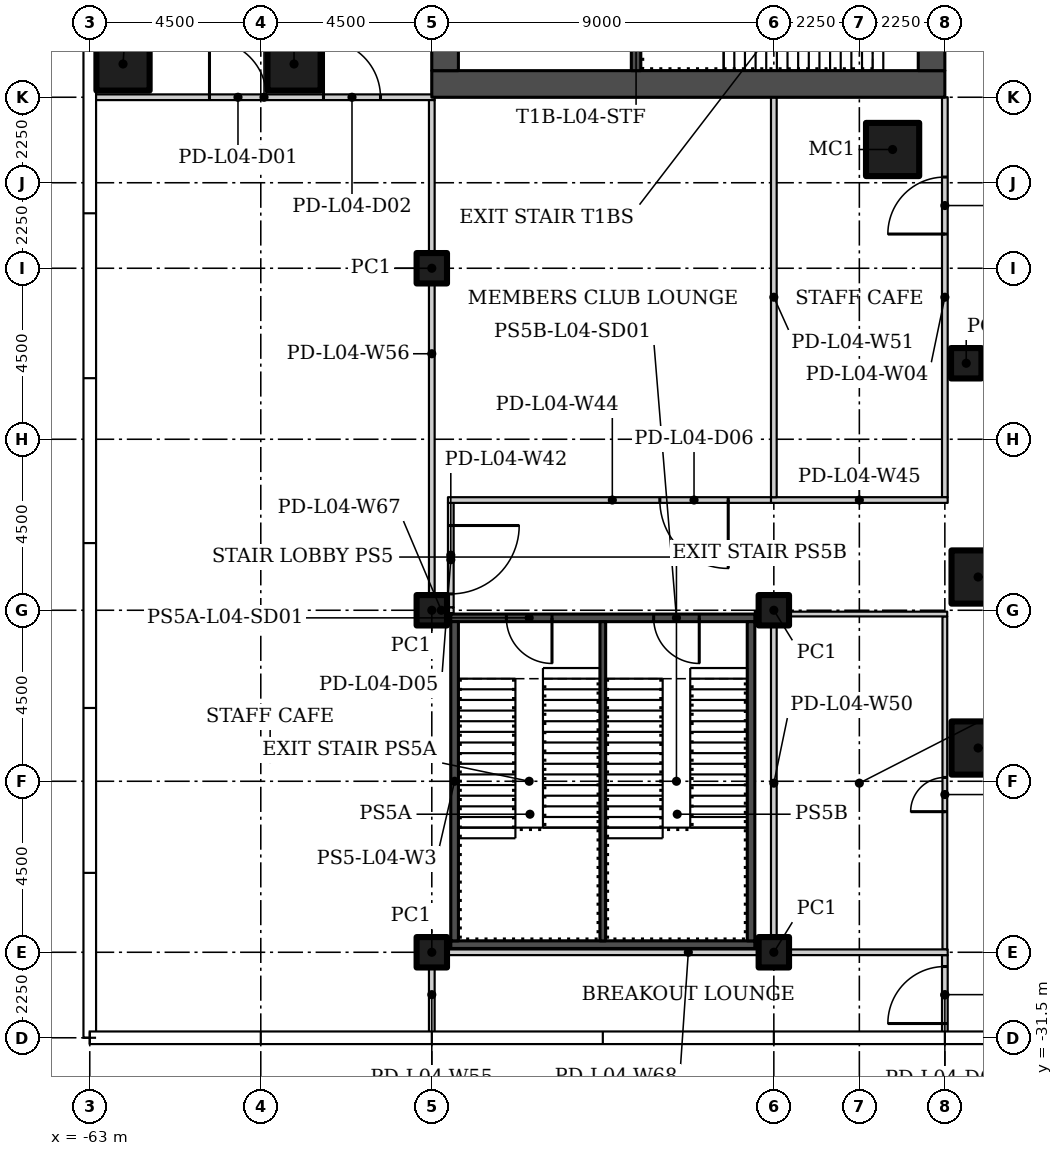
"""IFC4 building model, lengths in metres.
Left out: names, types, materials, properties, quantities, classifications, styles, units other than length and angle.
Written with IfcOpenShell. Run it as: python <this file> out.ifc"""

import sys

from ifc_helpers import new_model, si_unit, direction, frame, frame_2d, origin, origin_2d, place, context, subcontext, project, spatial, rectangle, hollow_rectangle, extrude, element, fill, save


model = new_model("IFC4")
c1 = context("Model", 3, precision=1e-05, world=origin(), true_north=direction((0.0, 1.0)))
c2 = subcontext(c1, "Body", "Model", "MODEL_VIEW")
j1 = project(units=[si_unit("LENGTHUNIT", "METRE"), si_unit("PLANEANGLEUNIT", "RADIAN")], contexts=[c1])
p1 = place(None, origin())
s1 = spatial("IfcSite", under=j1, at=p1, CompositionType="ELEMENT")
p2 = place(p1, origin())
s2 = spatial("IfcBuilding", under=s1, at=p2, CompositionType="ELEMENT")
p3 = place(p2, frame((0.0, 0.0, 23.5)))
s3 = spatial("IfcBuildingStorey", under=s2, at=p3, CompositionType="ELEMENT", Elevation=23.5)
for number, where in (
    (1, (-41.875, -8.125, 0.0)),
    (2, (-57.625, -5.875, 0.0)),
    (3, (-62.125, -5.875, 0.0)),
):
    element("IfcColumn", number, at=place(p3, frame(where)), inside=s3, PredefinedType="COLUMN", context=c2, shape_type="SweptSolid", body=[
        extrude(hollow_rectangle(XDim=1.4, YDim=1.4, WallThickness=0.06, at=origin_2d()), origin(), (0.0, 0.0, 1.0), 4.65),
    ])
p4 = place(p3, frame((-39.938, -13.75, 0.0)))
e4 = element("IfcColumn", 4, at=p4, inside=s3, PredefinedType="COLUMN", context=c2, shape_type="SweptSolid", body=[
    extrude(hollow_rectangle(XDim=0.8, YDim=0.8, WallThickness=0.03, at=origin_2d()), origin(), (0.0, 0.0, 1.0), 4.65),
])
for number, where in (
    (5, (-39.625, -19.375, 0.0)),
    (6, (-39.625, -23.875, 0.0)),
):
    element("IfcColumn", number, at=place(p3, frame(where)), inside=s3, PredefinedType="COLUMN", context=c2, shape_type="SweptSolid", body=[
        extrude(hollow_rectangle(XDim=1.4, YDim=1.4, WallThickness=0.06, at=origin_2d()), origin(), (0.0, 0.0, 1.0), 4.65),
    ])
for number, where in (
    (7, (-54.0, -29.25, 0.0)),
    (8, (-54.0, -20.25, 0.0)),
    (9, (-54.0, -11.25, 0.0)),
    (10, (-45.0, -29.25, 0.0)),
    (11, (-45.0, -20.25, 0.0)),
):
    element("IfcColumn", number, at=place(p3, frame(where)), inside=s3, PredefinedType="COLUMN", context=c2, shape_type="SweptSolid", body=[
        extrude(hollow_rectangle(XDim=0.8, YDim=0.8, WallThickness=0.03, at=origin_2d()), origin(), (0.0, 0.0, 1.0), 4.65),
    ])
p5 = place(p3, frame((-40.5, -31.405, 0.0), z_axis=(0.0, 0.0, 1.0), x_axis=(0.0, 1.0, 0.0)))
e12 = element("IfcWall", 12, at=p5, inside=s3, PredefinedType="PARTITIONING", context=c2, shape_type="SweptSolid", body=[
    extrude(rectangle(XDim=2.08, YDim=0.15, at=frame_2d((1.04, 0.0))), origin(), (0.0, 0.0, 1.0), 4.65),
])
p6 = place(p5, frame((0.28, 0.0, 0.0)))
e13 = element("IfcOpeningElement", 13, at=p6, cuts=e12, PredefinedType="OPENING", context=c2, shape_type="SweptSolid", body=[
    extrude(rectangle(XDim=1.5, YDim=2.1, at=frame_2d((0.75, 1.05))), frame((0.0, 0.085, 0.0), z_axis=(0.0, -1.0, 0.0), x_axis=(1.0, 0.0, 0.0)), (0.0, 0.0, 1.0), 0.17),
])
p7 = place(p3, frame((-40.5, -17.275, 0.0), z_axis=(0.0, 0.0, 1.0), x_axis=(0.0, 1.0, 0.0)))
e14 = element("IfcWall", 14, at=p7, inside=s3, PredefinedType="PARTITIONING", context=c2, shape_type="SweptSolid", body=[
    extrude(rectangle(XDim=10.525, YDim=0.15, at=frame_2d((5.262, 0.0))), origin(), (0.0, 0.0, 1.0), 4.65),
])
p8 = place(p7, frame((6.925, 0.0, 0.0)))
e15 = element("IfcOpeningElement", 15, at=p8, cuts=e14, PredefinedType="OPENING", context=c2, shape_type="SweptSolid", body=[
    extrude(rectangle(XDim=1.5, YDim=2.1, at=frame_2d((0.75, 1.05))), frame((0.0, 0.085, 0.0), z_axis=(0.0, -1.0, 0.0), x_axis=(1.0, 0.0, 0.0)), (0.0, 0.0, 1.0), 0.17),
])
p9 = place(p3, frame((-40.5, -29.175, 0.0), z_axis=(0.0, 0.0, 1.0), x_axis=(0.0, 1.0, 0.0)))
e16 = element("IfcWall", 16, at=p9, inside=s3, PredefinedType="PARTITIONING", context=c2, shape_type="SweptSolid", body=[
    extrude(rectangle(XDim=8.763, YDim=0.125, at=frame_2d((4.381, 0.0))), origin(), (0.0, 0.0, 1.0), 4.65),
])
p10 = place(p9, frame((3.625, 0.0, 0.0)))
e17 = element("IfcOpeningElement", 17, at=p10, cuts=e16, PredefinedType="OPENING", context=c2, shape_type="SweptSolid", body=[
    extrude(rectangle(XDim=0.9, YDim=2.1, at=frame_2d((0.45, 1.05))), frame((0.0, 0.073, 0.0), z_axis=(0.0, -1.0, 0.0), x_axis=(1.0, 0.0, 0.0)), (0.0, 0.0, 1.0), 0.145),
])
p11 = place(p3, frame((-62.905, -6.75, 0.0)))
e18 = element("IfcWall", 18, at=p11, inside=s3, PredefinedType="PARTITIONING", context=c2, shape_type="SweptSolid", body=[
    extrude(rectangle(XDim=8.98, YDim=0.15, at=frame_2d((4.49, 0.0))), origin(), (0.0, 0.0, 1.0), 4.65),
])
p12 = place(p11, frame((3.055, 0.0, 0.0)))
e19 = element("IfcOpeningElement", 19, at=p12, cuts=e18, PredefinedType="OPENING", context=c2, shape_type="SweptSolid", body=[
    extrude(rectangle(XDim=1.5, YDim=2.1, at=frame_2d((0.75, 1.05))), frame((0.0, 0.085, 0.0), z_axis=(0.0, -1.0, 0.0), x_axis=(1.0, 0.0, 0.0)), (0.0, 0.0, 1.0), 0.17),
])
p13 = place(p11, frame((6.055, 0.0, 0.0)))
e20 = element("IfcOpeningElement", 20, at=p13, cuts=e18, PredefinedType="OPENING", context=c2, shape_type="SweptSolid", body=[
    extrude(rectangle(XDim=1.5, YDim=2.1, at=frame_2d((0.75, 1.05))), frame((0.0, 0.085, 0.0), z_axis=(0.0, -1.0, 0.0), x_axis=(1.0, 0.0, 0.0)), (0.0, 0.0, 1.0), 0.17),
])
p14 = place(p3, frame((-45.5, -20.35, 0.0)))
e21 = element("IfcWall", 21, at=p14, inside=s3, PredefinedType="PARTITIONING", context=c2, shape_type="SweptSolid", body=[
    extrude(rectangle(XDim=0.575, YDim=0.15, at=frame_2d((0.288, 0.0))), origin(), (0.0, 0.0, 1.0), 4.65),
])
p15 = place(p3, frame((-53.5, -17.425, 0.0), z_axis=(0.0, 0.0, 1.0), x_axis=(0.0, -1.0, 0.0)))
e22 = element("IfcWall", 22, at=p15, inside=s3, PredefinedType="PARTITIONING", context=c2, shape_type="SweptSolid", body=[
    extrude(rectangle(XDim=2.75, YDim=0.15, at=frame_2d((1.375, 0.0))), origin(), (0.0, 0.0, 1.0), 4.65),
])
p16 = place(p15, frame((0.595, 0.0, 0.0)))
e23 = element("IfcOpeningElement", 23, at=p16, cuts=e22, PredefinedType="OPENING", context=c2, shape_type="SweptSolid", body=[
    extrude(rectangle(XDim=1.8, YDim=2.4, at=frame_2d((0.9, 1.2))), frame((0.0, 0.085, 0.0), z_axis=(0.0, -1.0, 0.0), x_axis=(1.0, 0.0, 0.0)), (0.0, 0.0, 1.0), 0.17),
])
p17 = place(p3, frame((-44.925, -17.35, 0.0), z_axis=(0.0, 0.0, 1.0), x_axis=(-1.0, 0.0, 0.0)))
e24 = element("IfcWall", 24, at=p17, inside=s3, PredefinedType="PARTITIONING", context=c2, shape_type="SweptSolid", body=[
    extrude(rectangle(XDim=8.65, YDim=0.15, at=frame_2d((4.325, 0.0))), origin(), (0.0, 0.0, 1.0), 4.65),
])
p18 = place(p17, frame((1.275, 0.0, 0.0)))
e25 = element("IfcOpeningElement", 25, at=p18, cuts=e24, PredefinedType="OPENING", context=c2, shape_type="SweptSolid", body=[
    extrude(rectangle(XDim=1.8, YDim=2.4, at=frame_2d((0.9, 1.2))), frame((0.0, 0.085, 0.0), z_axis=(0.0, -1.0, 0.0), x_axis=(1.0, 0.0, 0.0)), (0.0, 0.0, 1.0), 0.17),
])
p19 = place(p3, frame((-45.075, -17.35, 0.0)))
e26 = element("IfcWall", 26, at=p19, inside=s3, PredefinedType="PARTITIONING", context=c2, shape_type="SweptSolid", body=[
    extrude(rectangle(XDim=4.65, YDim=0.15, at=frame_2d((2.325, 0.0))), origin(), (0.0, 0.0, 1.0), 4.65),
])
p20 = place(p3, frame((-40.438, -20.35, 0.0), z_axis=(0.0, 0.0, 1.0), x_axis=(-1.0, 0.0, 0.0)))
e27 = element("IfcWall", 27, at=p20, inside=s3, PredefinedType="PARTITIONING", context=c2, shape_type="SweptSolid", body=[
    extrude(rectangle(XDim=4.637, YDim=0.125, at=frame_2d((2.319, 0.0))), origin(), (0.0, 0.0, 1.0), 4.65),
])
p21 = place(p3, frame((-45.0, -29.175, 0.0), z_axis=(0.0, 0.0, 1.0), x_axis=(0.0, 1.0, 0.0)))
e28 = element("IfcWall", 28, at=p21, inside=s3, PredefinedType="PARTITIONING", context=c2, shape_type="SweptSolid", body=[
    extrude(rectangle(XDim=8.75, YDim=0.15, at=frame_2d((4.375, 0.0))), origin(), (0.0, 0.0, 1.0), 4.65),
])
p22 = place(p3, frame((-45.0, -17.275, 0.0), z_axis=(0.0, 0.0, 1.0), x_axis=(0.0, 1.0, 0.0)))
e29 = element("IfcWall", 29, at=p22, inside=s3, PredefinedType="PARTITIONING", context=c2, shape_type="SweptSolid", body=[
    extrude(rectangle(XDim=10.525, YDim=0.15, at=frame_2d((5.262, 0.0))), origin(), (0.0, 0.0, 1.0), 4.65),
])
p23 = place(p3, frame((-54.0, -31.405, 0.0), z_axis=(0.0, 0.0, 1.0), x_axis=(0.0, 1.0, 0.0)))
e30 = element("IfcWall", 30, at=p23, inside=s3, PredefinedType="PARTITIONING", context=c2, shape_type="SweptSolid", body=[
    extrude(rectangle(XDim=2.08, YDim=0.15, at=frame_2d((1.04, 0.0))), origin(), (0.0, 0.0, 1.0), 4.65),
])
p24 = place(p3, frame((-54.0, -20.175, 0.0), z_axis=(0.0, 0.0, 1.0), x_axis=(0.0, 1.0, 0.0)))
e31 = element("IfcWall", 31, at=p24, inside=s3, PredefinedType="PARTITIONING", context=c2, shape_type="SweptSolid", body=[
    extrude(rectangle(XDim=13.35, YDim=0.15, at=frame_2d((6.675, 0.0))), origin(), (0.0, 0.0, 1.0), 4.65),
])
p25 = place(p3, frame((-53.425, -20.25, 0.0), z_axis=(0.0, 0.0, 1.0), x_axis=(-1.0, 0.0, 0.0)))
e32 = element("IfcWall", 32, at=p25, inside=s3, PredefinedType="PARTITIONING", context=c2, shape_type="SweptSolid", body=[
    extrude(rectangle(XDim=0.65, YDim=0.15, at=frame_2d((0.325, 0.0))), origin(), (0.0, 0.0, 1.0), 4.65),
])
p26 = place(p3, frame((-54.075, -29.25, 0.0)))
e33 = element("IfcWall", 33, at=p26, inside=s3, PredefinedType="PARTITIONING", context=c2, shape_type="SweptSolid", body=[
    extrude(rectangle(XDim=13.65, YDim=0.15, at=frame_2d((6.825, 0.0))), origin(), (0.0, 0.0, 1.0), 4.65),
])
p27 = place(p3, frame((-40.5, -6.4, 0.0), z_axis=(0.0, 0.0, 1.0), x_axis=(-1.0, 0.0, 0.0)))
e34 = element("IfcWall", 34, at=p27, inside=s3, PredefinedType="SHEAR", context=c2, shape_type="SweptSolid", body=[
    extrude(rectangle(XDim=13.5, YDim=0.7, at=frame_2d((6.75, 0.0))), origin(), (0.0, 0.0, 1.0), 4.65),
])
p28 = place(p3, frame((-40.85, -6.05, 0.0), z_axis=(0.0, 0.0, 1.0), x_axis=(0.0, 1.0, 0.0)))
e35 = element("IfcWall", 35, at=p28, inside=s3, PredefinedType="SHEAR", context=c2, shape_type="SweptSolid", body=[
    extrude(rectangle(XDim=12.1, YDim=0.7, at=frame_2d((6.05, 0.0))), origin(), (0.0, 0.0, 1.0), 4.65),
])
p29 = place(p28, frame((6.4, 0.0, 0.0)))
e36 = element("IfcOpeningElement", 36, at=p29, cuts=e35, PredefinedType="OPENING", context=c2, shape_type="SweptSolid", body=[
    extrude(rectangle(XDim=1.8, YDim=2.4, at=frame_2d((0.9, 1.2))), frame((0.0, 0.36, 0.0), z_axis=(0.0, -1.0, 0.0), x_axis=(1.0, 0.0, 0.0)), (0.0, 0.0, 1.0), 0.72),
])
p30 = place(p3, frame((-53.65, -6.05, 0.0), z_axis=(0.0, 0.0, 1.0), x_axis=(0.0, 1.0, 0.0)))
e37 = element("IfcWall", 37, at=p30, inside=s3, PredefinedType="SHEAR", context=c2, shape_type="SweptSolid", body=[
    extrude(rectangle(XDim=12.1, YDim=0.7, at=frame_2d((6.05, 0.0))), origin(), (0.0, 0.0, 1.0), 4.65),
])
p31 = place(p30, frame((0.8, 0.0, 0.0)))
e38 = element("IfcOpeningElement", 38, at=p31, cuts=e37, PredefinedType="OPENING", context=c2, shape_type="SweptSolid", body=[
    extrude(rectangle(XDim=1.2, YDim=2.1, at=frame_2d((0.6, 1.05))), frame((0.0, 0.36, 0.0), z_axis=(0.0, -1.0, 0.0), x_axis=(1.0, 0.0, 0.0)), (0.0, 0.0, 1.0), 0.72),
])
p32 = place(p30, frame((6.4, 0.0, 0.0)))
e39 = element("IfcOpeningElement", 39, at=p32, cuts=e37, PredefinedType="OPENING", context=c2, shape_type="SweptSolid", body=[
    extrude(rectangle(XDim=1.8, YDim=2.4, at=frame_2d((0.9, 1.2))), frame((0.0, 0.36, 0.0), z_axis=(0.0, -1.0, 0.0), x_axis=(1.0, 0.0, 0.0)), (0.0, 0.0, 1.0), 0.72),
])
p33 = place(p3, frame((-48.625, -6.05, 0.0), z_axis=(0.0, 0.0, 1.0), x_axis=(0.0, 1.0, 0.0)))
e40 = element("IfcWall", 40, at=p33, inside=s3, PredefinedType="SHEAR", context=c2, shape_type="SweptSolid", body=[
    extrude(rectangle(XDim=2.55, YDim=0.25, at=frame_2d((1.275, 0.0))), origin(), (0.0, 0.0, 1.0), 4.65),
])
p34 = place(p3, frame((-45.5, -20.45, 0.0), z_axis=(0.0, 0.0, 1.0), x_axis=(-1.0, 0.0, 0.0)))
e41 = element("IfcWall", 41, at=p34, inside=s3, PredefinedType="SHEAR", context=c2, shape_type="SweptSolid", body=[
    extrude(rectangle(XDim=8.0, YDim=0.2, at=frame_2d((4.0, 0.0))), origin(), (0.0, 0.0, 1.0), 4.65),
])
p35 = place(p34, frame((5.337, 0.0, 0.0)))
e42 = element("IfcOpeningElement", 42, at=p35, cuts=e41, PredefinedType="OPENING", context=c2, shape_type="SweptSolid", body=[
    extrude(rectangle(XDim=1.2, YDim=2.4, at=frame_2d((0.6, 1.2))), frame((0.0, 0.11, 0.0), z_axis=(0.0, -1.0, 0.0), x_axis=(1.0, 0.0, 0.0)), (0.0, 0.0, 1.0), 0.22),
])
p36 = place(p34, frame((1.462, 0.0, 0.0)))
e43 = element("IfcOpeningElement", 43, at=p36, cuts=e41, PredefinedType="OPENING", context=c2, shape_type="SweptSolid", body=[
    extrude(rectangle(XDim=1.2, YDim=2.4, at=frame_2d((0.6, 1.2))), frame((0.0, 0.11, 0.0), z_axis=(0.0, -1.0, 0.0), x_axis=(1.0, 0.0, 0.0)), (0.0, 0.0, 1.0), 0.22),
])
p37 = place(p3, frame((-53.5, -29.05, 0.0)))
e44 = element("IfcWall", 44, at=p37, inside=s3, PredefinedType="SHEAR", context=c2, shape_type="SweptSolid", body=[
    extrude(rectangle(XDim=8.0, YDim=0.2, at=frame_2d((4.0, 0.0))), origin(), (0.0, 0.0, 1.0), 4.65),
])
for number, where, z_axis, x_axis in (
    (45, (-53.4, -28.95, 0.0), (0.0, 0.0, 1.0), (0.0, 1.0, 0.0)),
    (46, (-45.6, -28.95, 0.0), (0.0, 0.0, 1.0), (0.0, 1.0, 0.0)),
):
    element("IfcWall", number, at=place(p3, frame(where, z_axis=z_axis, x_axis=x_axis)), inside=s3, PredefinedType="SHEAR", context=c2, shape_type="SweptSolid", body=[
        extrude(rectangle(XDim=8.4, YDim=0.2, at=frame_2d((4.2, 0.0))), origin(), (0.0, 0.0, 1.0), 4.65),
    ])
p38 = place(p3, frame((-49.5, -28.95, 0.0), z_axis=(0.0, 0.0, 1.0), x_axis=(0.0, 1.0, 0.0)))
e47 = element("IfcWall", 47, at=p38, inside=s3, PredefinedType="SHEAR", context=c2, shape_type="SweptSolid", body=[
    extrude(rectangle(XDim=8.4, YDim=0.15, at=frame_2d((4.2, 0.0))), origin(), (0.0, 0.0, 1.0), 4.65),
])
p39 = place(p12, origin())
e48 = element("IfcDoor", 48, at=p39, inside=s3, OperationType="DOUBLE_DOOR_SINGLE_SWING", PredefinedType="DOOR", context=c2, shape_type="SweptSolid", body=[
    extrude(rectangle(XDim=1.5, YDim=2.1, at=frame_2d((0.75, 1.05))), frame((0.0, 0.025, 0.0), z_axis=(0.0, -1.0, 0.0), x_axis=(1.0, 0.0, 0.0)), (0.0, 0.0, 1.0), 0.05),
])
fill(e19, e48)
p40 = place(p13, origin())
e49 = element("IfcDoor", 49, at=p40, inside=s3, OperationType="DOUBLE_DOOR_SINGLE_SWING", PredefinedType="DOOR", context=c2, shape_type="SweptSolid", body=[
    extrude(rectangle(XDim=1.5, YDim=2.1, at=frame_2d((0.75, 1.05))), frame((0.0, 0.025, 0.0), z_axis=(0.0, -1.0, 0.0), x_axis=(1.0, 0.0, 0.0)), (0.0, 0.0, 1.0), 0.05),
])
fill(e20, e49)
p41 = place(p16, origin())
e50 = element("IfcDoor", 50, at=p41, inside=s3, OperationType="DOUBLE_DOOR_SINGLE_SWING", PredefinedType="DOOR", context=c2, shape_type="SweptSolid", body=[
    extrude(rectangle(XDim=1.8, YDim=2.4, at=frame_2d((0.9, 1.2))), frame((0.0, 0.025, 0.0), z_axis=(0.0, -1.0, 0.0), x_axis=(1.0, 0.0, 0.0)), (0.0, 0.0, 1.0), 0.05),
])
fill(e23, e50)
p42 = place(p18, origin())
e51 = element("IfcDoor", 51, at=p42, inside=s3, OperationType="DOUBLE_DOOR_SINGLE_SWING", PredefinedType="DOOR", context=c2, shape_type="SweptSolid", body=[
    extrude(rectangle(XDim=1.8, YDim=2.4, at=frame_2d((0.9, 1.2))), frame((0.0, 0.025, 0.0), z_axis=(0.0, -1.0, 0.0), x_axis=(1.0, 0.0, 0.0)), (0.0, 0.0, 1.0), 0.05),
])
fill(e25, e51)
p43 = place(p6, origin())
e52 = element("IfcDoor", 52, at=p43, inside=s3, OperationType="DOUBLE_DOOR_SINGLE_SWING", PredefinedType="DOOR", context=c2, shape_type="SweptSolid", body=[
    extrude(rectangle(XDim=1.5, YDim=2.1, at=frame_2d((0.75, 1.05))), frame((0.0, 0.025, 0.0), z_axis=(0.0, -1.0, 0.0), x_axis=(1.0, 0.0, 0.0)), (0.0, 0.0, 1.0), 0.05),
])
fill(e13, e52)
p44 = place(p10, origin())
e53 = element("IfcDoor", 53, at=p44, inside=s3, OperationType="SINGLE_SWING_LEFT", PredefinedType="DOOR", context=c2, shape_type="SweptSolid", body=[
    extrude(rectangle(XDim=0.9, YDim=2.1, at=frame_2d((0.45, 1.05))), frame((0.0, 0.025, 0.0), z_axis=(0.0, -1.0, 0.0), x_axis=(1.0, 0.0, 0.0)), (0.0, 0.0, 1.0), 0.05),
])
fill(e17, e53)
p45 = place(p8, origin())
e54 = element("IfcDoor", 54, at=p45, inside=s3, OperationType="DOUBLE_DOOR_SINGLE_SWING", PredefinedType="DOOR", context=c2, shape_type="SweptSolid", body=[
    extrude(rectangle(XDim=1.5, YDim=2.1, at=frame_2d((0.75, 1.05))), frame((0.0, 0.025, 0.0), z_axis=(0.0, -1.0, 0.0), x_axis=(1.0, 0.0, 0.0)), (0.0, 0.0, 1.0), 0.05),
])
fill(e15, e54)
p46 = place(p35, origin())
e55 = element("IfcDoor", 55, at=p46, inside=s3, OperationType="SINGLE_SWING_LEFT", PredefinedType="DOOR", context=c2, shape_type="SweptSolid", body=[
    extrude(rectangle(XDim=1.2, YDim=2.4, at=frame_2d((0.6, 1.2))), frame((0.0, 0.025, 0.0), z_axis=(0.0, -1.0, 0.0), x_axis=(1.0, 0.0, 0.0)), (0.0, 0.0, 1.0), 0.05),
])
fill(e42, e55)
p47 = place(p36, origin())
e56 = element("IfcDoor", 56, at=p47, inside=s3, OperationType="SINGLE_SWING_RIGHT", PredefinedType="DOOR", context=c2, shape_type="SweptSolid", body=[
    extrude(rectangle(XDim=1.2, YDim=2.4, at=frame_2d((0.6, 1.2))), frame((0.0, 0.025, 0.0), z_axis=(0.0, -1.0, 0.0), x_axis=(1.0, 0.0, 0.0)), (0.0, 0.0, 1.0), 0.05),
])
fill(e43, e56)
save(model, sys.argv[1])
